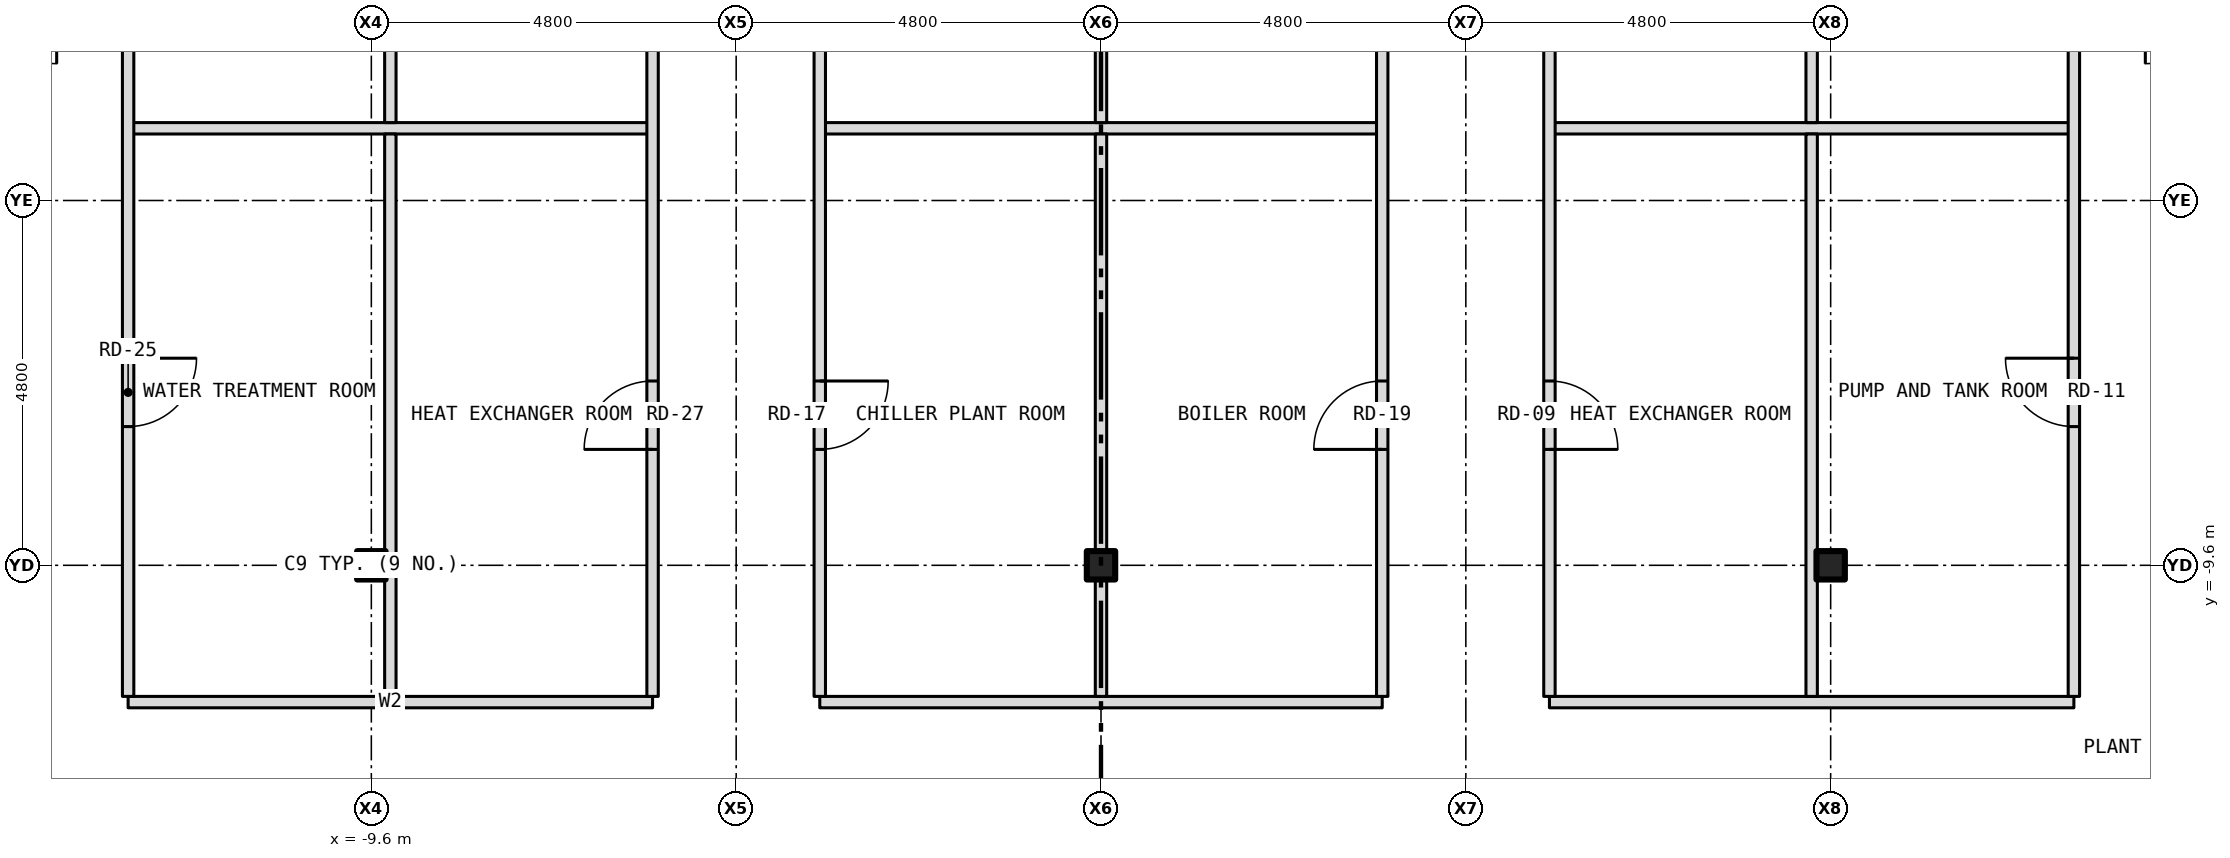
"""IFC4 building model, lengths in metres.
Left out: names, types, materials, properties, quantities, classifications, styles, units other than length and angle.
Written with IfcOpenShell. Run it as: python <this file> out.ifc"""

import sys

from ifc_helpers import new_model, si_unit, direction, frame, frame_2d, origin, origin_2d, place, context, subcontext, project, spatial, rectangle, i_section, extrude, element, fill, save


model = new_model("IFC4")
c1 = context("Model", 3, precision=1e-05, world=origin(), true_north=direction((0.0, 1.0)))
c2 = subcontext(c1, "Body", "Model", "MODEL_VIEW")
j1 = project(units=[si_unit("LENGTHUNIT", "METRE"), si_unit("PLANEANGLEUNIT", "RADIAN")], contexts=[c1])
p1 = place(None, origin())
s1 = spatial("IfcSite", under=j1, at=p1, CompositionType="ELEMENT")
p2 = place(p1, origin())
s2 = spatial("IfcBuilding", under=s1, at=p2, CompositionType="ELEMENT")
p3 = place(p2, frame((0.0, 0.0, 186.5)))
s3 = spatial("IfcBuildingStorey", under=s2, at=p3, CompositionType="ELEMENT", Elevation=186.5)
for number, where, z_axis, x_axis in (
    (1, (-9.6, -9.6, -0.3), (0.0, 0.0, 1.0), (1.0, 0.0, 0.0)),
    (2, (0.0, -9.6, -0.3), (0.0, 0.0, 1.0), (1.0, 0.0, 0.0)),
    (3, (9.6, -9.6, -0.3), (0.0, 0.0, 1.0), (1.0, 0.0, 0.0)),
):
    element("IfcColumn", number, at=place(p3, frame(where, z_axis=z_axis, x_axis=x_axis)), inside=s3, PredefinedType="COLUMN", context=c2, shape_type="SweptSolid", body=[
        extrude(i_section(OverallWidth=0.373, OverallDepth=0.373, WebThickness=0.016, FlangeThickness=0.026, at=origin_2d()), origin(), (0.0, 0.0, 1.0), 4.65),
    ])
p4 = place(p3, frame((-12.8, -11.4, 0.0), z_axis=(0.0, 0.0, 1.0), x_axis=(1.0, 0.0, 0.0)))
e4 = element("IfcWall", 4, at=p4, inside=s3, PredefinedType="PARTITIONING", context=c2, shape_type="SweptSolid", body=[
    extrude(rectangle(XDim=6.9, YDim=0.15, at=frame_2d((3.45, 0.0))), origin(), (0.0, 0.0, 1.0), 4.35),
])
p5 = place(p3, frame((-3.7, -11.4, 0.0), z_axis=(0.0, 0.0, 1.0), x_axis=(1.0, 0.0, 0.0)))
e5 = element("IfcWall", 5, at=p5, inside=s3, PredefinedType="PARTITIONING", context=c2, shape_type="SweptSolid", body=[
    extrude(rectangle(XDim=7.4, YDim=0.15, at=frame_2d((3.7, 0.0))), origin(), (0.0, 0.0, 1.0), 4.35),
])
for number, where, z_axis, x_axis in (
    (6, (5.9, -11.4, 0.0), (0.0, 0.0, 1.0), (1.0, 0.0, 0.0)),
    (7, (-12.8, -3.85, 0.0), (0.0, 0.0, 1.0), (1.0, 0.0, 0.0)),
):
    element("IfcWall", number, at=place(p3, frame(where, z_axis=z_axis, x_axis=x_axis)), inside=s3, PredefinedType="PARTITIONING", context=c2, shape_type="SweptSolid", body=[
        extrude(rectangle(XDim=6.9, YDim=0.15, at=frame_2d((3.45, 0.0))), origin(), (0.0, 0.0, 1.0), 4.35),
    ])
p6 = place(p3, frame((-3.7, -3.85, 0.0), z_axis=(0.0, 0.0, 1.0), x_axis=(1.0, 0.0, 0.0)))
e8 = element("IfcWall", 8, at=p6, inside=s3, PredefinedType="PARTITIONING", context=c2, shape_type="SweptSolid", body=[
    extrude(rectangle(XDim=7.4, YDim=0.15, at=frame_2d((3.7, 0.0))), origin(), (0.0, 0.0, 1.0), 4.35),
])
p7 = place(p3, frame((5.9, -3.85, 0.0), z_axis=(0.0, 0.0, 1.0), x_axis=(1.0, 0.0, 0.0)))
e9 = element("IfcWall", 9, at=p7, inside=s3, PredefinedType="PARTITIONING", context=c2, shape_type="SweptSolid", body=[
    extrude(rectangle(XDim=6.9, YDim=0.15, at=frame_2d((3.45, 0.0))), origin(), (0.0, 0.0, 1.0), 4.35),
])
p8 = place(p3, frame((-12.8, -11.325, 0.0), z_axis=(0.0, 0.0, 1.0), x_axis=(0.0, 1.0, 0.0)))
e10 = element("IfcWall", 10, at=p8, inside=s3, PredefinedType="PARTITIONING", context=c2, shape_type="SweptSolid", body=[
    extrude(rectangle(XDim=9.325, YDim=0.15, at=frame_2d((4.663, 0.0))), origin(), (0.0, 0.0, 1.0), 4.35),
])
p9 = place(p8, frame((3.55, 0.0, 0.0)))
e11 = element("IfcOpeningElement", 11, at=p9, cuts=e10, PredefinedType="OPENING", context=c2, shape_type="SweptSolid", body=[
    extrude(rectangle(XDim=0.9, YDim=2.1, at=frame_2d((0.45, 1.05))), frame((0.0, 0.087, 0.0), z_axis=(0.0, -1.0, 0.0), x_axis=(1.0, 0.0, 0.0)), (0.0, 0.0, 1.0), 0.174),
])
for number, where, z_axis, x_axis in (
    (12, (-9.35, -11.325, 0.0), (0.0, 0.0, 1.0), (0.0, 1.0, 0.0)),
    (13, (-9.35, -3.775, 0.0), (0.0, 0.0, 1.0), (0.0, 1.0, 0.0)),
):
    element("IfcWall", number, at=place(p3, frame(where, z_axis=z_axis, x_axis=x_axis)), inside=s3, PredefinedType="PARTITIONING", context=c2, shape_type="SweptSolid", body=[
        extrude(rectangle(XDim=7.4, YDim=0.15, at=frame_2d((3.7, 0.0))), origin(), (0.0, 0.0, 1.0), 4.35),
    ])
p10 = place(p3, frame((-5.9, -11.325, 0.0), z_axis=(0.0, 0.0, 1.0), x_axis=(0.0, 1.0, 0.0)))
e14 = element("IfcWall", 14, at=p10, inside=s3, PredefinedType="PARTITIONING", context=c2, shape_type="SweptSolid", body=[
    extrude(rectangle(XDim=14.95, YDim=0.15, at=frame_2d((7.475, 0.0))), origin(), (0.0, 0.0, 1.0), 4.35),
])
p11 = place(p10, frame((3.25, 0.0, 0.0)))
e15 = element("IfcOpeningElement", 15, at=p11, cuts=e14, PredefinedType="OPENING", context=c2, shape_type="SweptSolid", body=[
    extrude(rectangle(XDim=0.9, YDim=2.1, at=frame_2d((0.45, 1.05))), frame((0.0, 0.087, 0.0), z_axis=(0.0, -1.0, 0.0), x_axis=(1.0, 0.0, 0.0)), (0.0, 0.0, 1.0), 0.174),
])
p12 = place(p10, frame((10.8, 0.0, 0.0)))
e16 = element("IfcOpeningElement", 16, at=p12, cuts=e14, PredefinedType="OPENING", context=c2, shape_type="SweptSolid", body=[
    extrude(rectangle(XDim=0.9, YDim=2.1, at=frame_2d((0.45, 1.05))), frame((0.0, 0.087, 0.0), z_axis=(0.0, -1.0, 0.0), x_axis=(1.0, 0.0, 0.0)), (0.0, 0.0, 1.0), 0.174),
])
p13 = place(p3, frame((-3.7, -11.325, 0.0), z_axis=(0.0, 0.0, 1.0), x_axis=(0.0, 1.0, 0.0)))
e17 = element("IfcWall", 17, at=p13, inside=s3, PredefinedType="PARTITIONING", context=c2, shape_type="SweptSolid", body=[
    extrude(rectangle(XDim=14.95, YDim=0.15, at=frame_2d((7.475, 0.0))), origin(), (0.0, 0.0, 1.0), 4.35),
])
p14 = place(p13, frame((3.25, 0.0, 0.0)))
e18 = element("IfcOpeningElement", 18, at=p14, cuts=e17, PredefinedType="OPENING", context=c2, shape_type="SweptSolid", body=[
    extrude(rectangle(XDim=0.9, YDim=2.1, at=frame_2d((0.45, 1.05))), frame((0.0, 0.087, 0.0), z_axis=(0.0, -1.0, 0.0), x_axis=(1.0, 0.0, 0.0)), (0.0, 0.0, 1.0), 0.174),
])
p15 = place(p13, frame((10.8, 0.0, 0.0)))
e19 = element("IfcOpeningElement", 19, at=p15, cuts=e17, PredefinedType="OPENING", context=c2, shape_type="SweptSolid", body=[
    extrude(rectangle(XDim=0.9, YDim=2.1, at=frame_2d((0.45, 1.05))), frame((0.0, 0.087, 0.0), z_axis=(0.0, -1.0, 0.0), x_axis=(1.0, 0.0, 0.0)), (0.0, 0.0, 1.0), 0.174),
])
p16 = place(p3, frame((0.0, -11.325, 0.0), z_axis=(0.0, 0.0, 1.0), x_axis=(0.0, 1.0, 0.0)))
e20 = element("IfcWall", 20, at=p16, inside=s3, PredefinedType="PARTITIONING", context=c2, shape_type="SweptSolid", body=[
    extrude(rectangle(XDim=1.538, YDim=0.15, at=frame_2d((0.769, 0.0))), origin(), (0.0, 0.0, 1.0), 3.728),
])
p17 = place(p3, frame((0.0, -9.787, 0.0), z_axis=(0.0, 0.0, 1.0), x_axis=(0.0, 1.0, 0.0)))
e21 = element("IfcWall", 21, at=p17, inside=s3, PredefinedType="PARTITIONING", context=c2, shape_type="SweptSolid", body=[
    extrude(rectangle(XDim=0.374, YDim=0.15, at=frame_2d((0.187, 0.0))), origin(), (0.0, 0.0, 1.0), 4.35),
])
p18 = place(p3, frame((0.0, -9.413, 0.0), z_axis=(0.0, 0.0, 1.0), x_axis=(0.0, 1.0, 0.0)))
e22 = element("IfcWall", 22, at=p18, inside=s3, PredefinedType="PARTITIONING", context=c2, shape_type="SweptSolid", body=[
    extrude(rectangle(XDim=5.488, YDim=0.15, at=frame_2d((2.744, 0.0))), origin(), (0.0, 0.0, 1.0), 3.728),
])
p19 = place(p3, frame((0.0, -3.775, 0.0), z_axis=(0.0, 0.0, 1.0), x_axis=(0.0, 1.0, 0.0)))
e23 = element("IfcWall", 23, at=p19, inside=s3, PredefinedType="PARTITIONING", context=c2, shape_type="SweptSolid", body=[
    extrude(rectangle(XDim=3.588, YDim=0.15, at=frame_2d((1.794, 0.0))), origin(), (0.0, 0.0, 1.0), 3.728),
])
p20 = place(p3, frame((3.7, -11.325, 0.0), z_axis=(0.0, 0.0, 1.0), x_axis=(0.0, 1.0, 0.0)))
e24 = element("IfcWall", 24, at=p20, inside=s3, PredefinedType="PARTITIONING", context=c2, shape_type="SweptSolid", body=[
    extrude(rectangle(XDim=14.95, YDim=0.15, at=frame_2d((7.475, 0.0))), origin(), (0.0, 0.0, 1.0), 4.35),
])
p21 = place(p20, frame((3.25, 0.0, 0.0)))
e25 = element("IfcOpeningElement", 25, at=p21, cuts=e24, PredefinedType="OPENING", context=c2, shape_type="SweptSolid", body=[
    extrude(rectangle(XDim=0.9, YDim=2.1, at=frame_2d((0.45, 1.05))), frame((0.0, 0.087, 0.0), z_axis=(0.0, -1.0, 0.0), x_axis=(1.0, 0.0, 0.0)), (0.0, 0.0, 1.0), 0.174),
])
p22 = place(p20, frame((10.8, 0.0, 0.0)))
e26 = element("IfcOpeningElement", 26, at=p22, cuts=e24, PredefinedType="OPENING", context=c2, shape_type="SweptSolid", body=[
    extrude(rectangle(XDim=0.9, YDim=2.1, at=frame_2d((0.45, 1.05))), frame((0.0, 0.087, 0.0), z_axis=(0.0, -1.0, 0.0), x_axis=(1.0, 0.0, 0.0)), (0.0, 0.0, 1.0), 0.174),
])
p23 = place(p3, frame((5.9, -11.325, 0.0), z_axis=(0.0, 0.0, 1.0), x_axis=(0.0, 1.0, 0.0)))
e27 = element("IfcWall", 27, at=p23, inside=s3, PredefinedType="PARTITIONING", context=c2, shape_type="SweptSolid", body=[
    extrude(rectangle(XDim=14.95, YDim=0.15, at=frame_2d((7.475, 0.0))), origin(), (0.0, 0.0, 1.0), 4.35),
])
p24 = place(p23, frame((3.25, 0.0, 0.0)))
e28 = element("IfcOpeningElement", 28, at=p24, cuts=e27, PredefinedType="OPENING", context=c2, shape_type="SweptSolid", body=[
    extrude(rectangle(XDim=0.9, YDim=2.1, at=frame_2d((0.45, 1.05))), frame((0.0, 0.087, 0.0), z_axis=(0.0, -1.0, 0.0), x_axis=(1.0, 0.0, 0.0)), (0.0, 0.0, 1.0), 0.174),
])
p25 = place(p23, frame((10.8, 0.0, 0.0)))
e29 = element("IfcOpeningElement", 29, at=p25, cuts=e27, PredefinedType="OPENING", context=c2, shape_type="SweptSolid", body=[
    extrude(rectangle(XDim=0.9, YDim=2.1, at=frame_2d((0.45, 1.05))), frame((0.0, 0.087, 0.0), z_axis=(0.0, -1.0, 0.0), x_axis=(1.0, 0.0, 0.0)), (0.0, 0.0, 1.0), 0.174),
])
for number, where, z_axis, x_axis in (
    (30, (9.35, -11.325, 0.0), (0.0, 0.0, 1.0), (0.0, 1.0, 0.0)),
    (31, (9.35, -3.775, 0.0), (0.0, 0.0, 1.0), (0.0, 1.0, 0.0)),
):
    element("IfcWall", number, at=place(p3, frame(where, z_axis=z_axis, x_axis=x_axis)), inside=s3, PredefinedType="PARTITIONING", context=c2, shape_type="SweptSolid", body=[
        extrude(rectangle(XDim=7.4, YDim=0.15, at=frame_2d((3.7, 0.0))), origin(), (0.0, 0.0, 1.0), 4.35),
    ])
p26 = place(p3, frame((12.8, -11.325, 0.0), z_axis=(0.0, 0.0, 1.0), x_axis=(0.0, 1.0, 0.0)))
e32 = element("IfcWall", 32, at=p26, inside=s3, PredefinedType="PARTITIONING", context=c2, shape_type="SweptSolid", body=[
    extrude(rectangle(XDim=9.325, YDim=0.15, at=frame_2d((4.663, 0.0))), origin(), (0.0, 0.0, 1.0), 4.35),
])
p27 = place(p26, frame((3.55, 0.0, 0.0)))
e33 = element("IfcOpeningElement", 33, at=p27, cuts=e32, PredefinedType="OPENING", context=c2, shape_type="SweptSolid", body=[
    extrude(rectangle(XDim=0.9, YDim=2.1, at=frame_2d((0.45, 1.05))), frame((0.0, 0.087, 0.0), z_axis=(0.0, -1.0, 0.0), x_axis=(1.0, 0.0, 0.0)), (0.0, 0.0, 1.0), 0.174),
])
p28 = place(p24, origin())
e34 = element("IfcDoor", 34, at=p28, inside=s3, OperationType="SINGLE_SWING_LEFT", PredefinedType="DOOR", context=c2, shape_type="SweptSolid", body=[
    extrude(rectangle(XDim=0.9, YDim=2.1, at=frame_2d((0.45, 1.05))), frame((0.0, 0.025, 0.0), z_axis=(0.0, -1.0, 0.0), x_axis=(1.0, 0.0, 0.0)), (0.0, 0.0, 1.0), 0.05),
])
fill(e28, e34)
p29 = place(p27, origin())
e35 = element("IfcDoor", 35, at=p29, inside=s3, OperationType="SINGLE_SWING_RIGHT", PredefinedType="DOOR", context=c2, shape_type="SweptSolid", body=[
    extrude(rectangle(XDim=0.9, YDim=2.1, at=frame_2d((0.45, 1.05))), frame((0.0, 0.025, 0.0), z_axis=(0.0, -1.0, 0.0), x_axis=(1.0, 0.0, 0.0)), (0.0, 0.0, 1.0), 0.05),
])
fill(e33, e35)
p30 = place(p14, origin())
e36 = element("IfcDoor", 36, at=p30, inside=s3, OperationType="SINGLE_SWING_RIGHT", PredefinedType="DOOR", context=c2, shape_type="SweptSolid", body=[
    extrude(rectangle(XDim=0.9, YDim=2.1, at=frame_2d((0.45, 1.05))), frame((0.0, 0.025, 0.0), z_axis=(0.0, -1.0, 0.0), x_axis=(1.0, 0.0, 0.0)), (0.0, 0.0, 1.0), 0.05),
])
fill(e18, e36)
p31 = place(p21, origin())
e37 = element("IfcDoor", 37, at=p31, inside=s3, OperationType="SINGLE_SWING_LEFT", PredefinedType="DOOR", context=c2, shape_type="SweptSolid", body=[
    extrude(rectangle(XDim=0.9, YDim=2.1, at=frame_2d((0.45, 1.05))), frame((0.0, 0.025, 0.0), z_axis=(0.0, -1.0, 0.0), x_axis=(1.0, 0.0, 0.0)), (0.0, 0.0, 1.0), 0.05),
])
fill(e25, e37)
p32 = place(p9, origin())
e38 = element("IfcDoor", 38, at=p32, inside=s3, OperationType="SINGLE_SWING_RIGHT", PredefinedType="DOOR", context=c2, shape_type="SweptSolid", body=[
    extrude(rectangle(XDim=0.9, YDim=2.1, at=frame_2d((0.45, 1.05))), frame((0.0, 0.025, 0.0), z_axis=(0.0, -1.0, 0.0), x_axis=(1.0, 0.0, 0.0)), (0.0, 0.0, 1.0), 0.05),
])
fill(e11, e38)
p33 = place(p11, origin())
e39 = element("IfcDoor", 39, at=p33, inside=s3, OperationType="SINGLE_SWING_LEFT", PredefinedType="DOOR", context=c2, shape_type="SweptSolid", body=[
    extrude(rectangle(XDim=0.9, YDim=2.1, at=frame_2d((0.45, 1.05))), frame((0.0, 0.025, 0.0), z_axis=(0.0, -1.0, 0.0), x_axis=(1.0, 0.0, 0.0)), (0.0, 0.0, 1.0), 0.05),
])
fill(e15, e39)
save(model, sys.argv[1])
